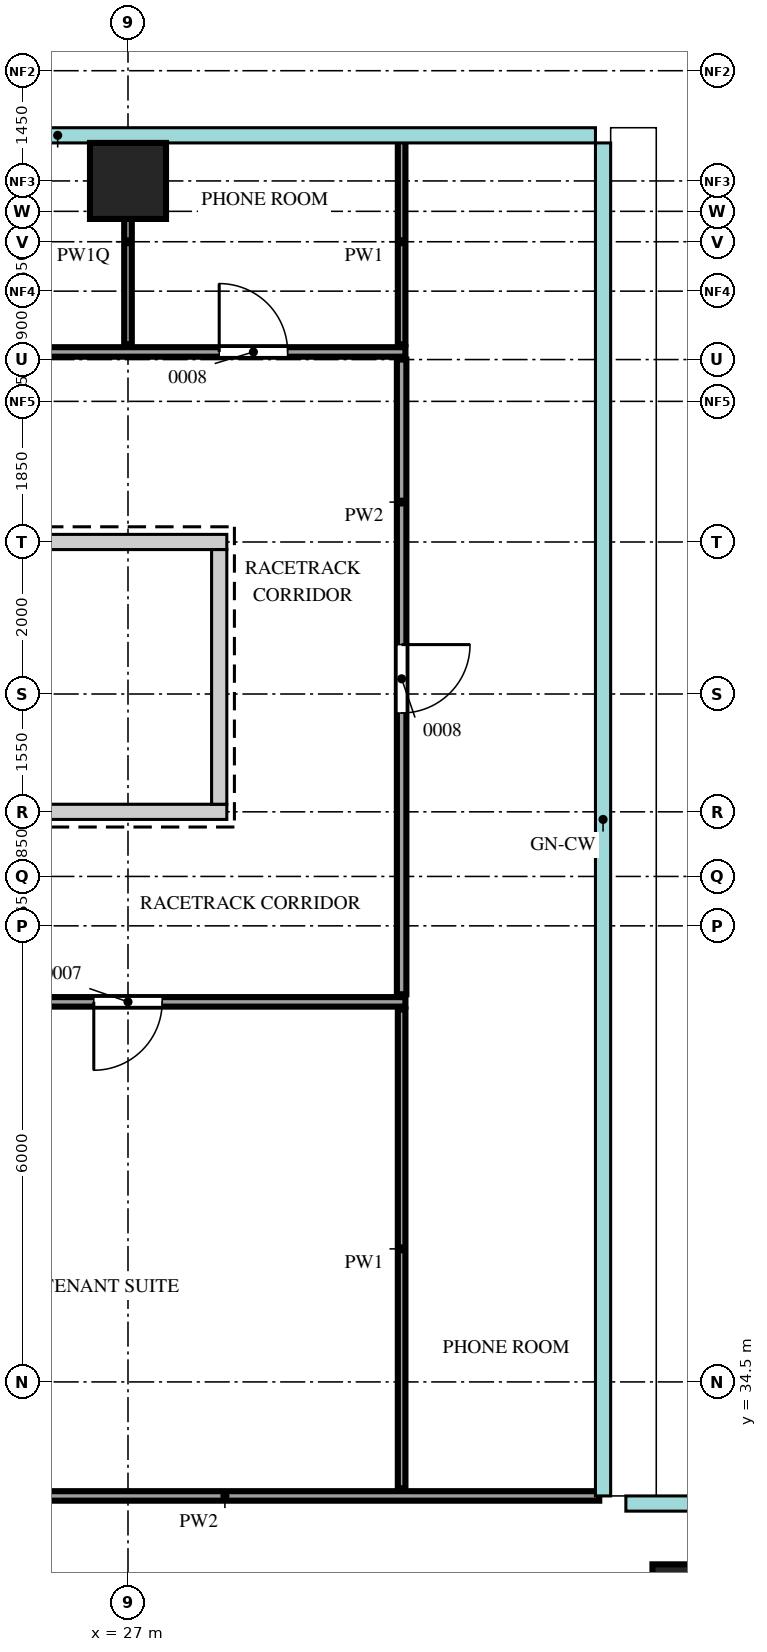
"""IFC4 building model, lengths in metres.
Left out: names, types, materials, properties, quantities, classifications, styles, units other than length and angle.
Written with IfcOpenShell. Run it as: python <this file> out.ifc"""

import sys

from ifc_helpers import new_model, si_unit, direction, frame, frame_2d, origin, origin_2d, place, context, subcontext, project, spatial, rectangle, extrude, source, transform, mapped, element, fill, save


model = new_model("IFC4")
c1 = context("Model", 3, precision=1e-05, world=origin(), true_north=direction((0.0, 1.0)))
c2 = subcontext(c1, "Body", "Model", "MODEL_VIEW")
j1 = project(units=[si_unit("LENGTHUNIT", "METRE"), si_unit("PLANEANGLEUNIT", "RADIAN")], contexts=[c1])
p1 = place(None, origin())
s1 = spatial("IfcSite", under=j1, at=p1, CompositionType="ELEMENT")
p2 = place(p1, origin())
s2 = spatial("IfcBuilding", under=s1, at=p2, CompositionType="ELEMENT")
p3 = place(p2, frame((0.0, 0.0, 180.7)))
s3 = spatial("IfcBuildingStorey", under=s2, at=p3, CompositionType="ELEMENT", Elevation=180.7)
m1 = source(origin(), c2, "Body", "SweptSolid", [
    extrude(rectangle(XDim=7.1, YDim=0.2, at=frame_2d((3.55, 0.0))), origin(), (0.0, 0.0, 1.0), 3.75),
])
p4 = place(p3, frame((21.2, 45.55, 0.0), z_axis=(0.0, 0.0, 1.0), x_axis=(1.0, 0.0, 0.0)))
e1 = element("IfcWall", 1, at=p4, inside=s3, PredefinedType="SHEAR", context=c2, shape_type="MappedRepresentation", body=[
    mapped(m1, transform((0.0, 0.0, 0.0))),
])
m2 = source(origin(), c2, "Body", "SweptSolid", [
    extrude(rectangle(XDim=1.2, YDim=2.1, at=frame_2d((0.6, 1.05))), frame((0.0, 0.11, 0.0), z_axis=(0.0, -1.0, 0.0), x_axis=(1.0, 0.0, 0.0)), (0.0, 0.0, 1.0), 0.22),
])
p5 = place(p4, frame((0.15, 0.0, 0.0)))
e2 = element("IfcOpeningElement", 2, at=p5, cuts=e1, PredefinedType="OPENING", context=c2, shape_type="MappedRepresentation", body=[
    mapped(m2, transform((0.0, 0.0, 0.0))),
])
p6 = place(p3, frame((21.2, 42.0, 0.0), z_axis=(0.0, 0.0, 1.0), x_axis=(1.0, 0.0, 0.0)))
e3 = element("IfcWall", 3, at=p6, inside=s3, PredefinedType="SHEAR", context=c2, shape_type="MappedRepresentation", body=[
    mapped(m1, transform((0.0, 0.0, 0.0))),
])
m3 = source(origin(), c2, "Body", "SweptSolid", [
    extrude(rectangle(XDim=3.35, YDim=0.2, at=frame_2d((1.675, 0.0))), origin(), (0.0, 0.0, 1.0), 3.75),
])
p7 = place(p3, frame((28.2, 42.1, 0.0), z_axis=(0.0, 0.0, 1.0), x_axis=(0.0, 1.0, 0.0)))
e4 = element("IfcWall", 4, at=p7, inside=s3, PredefinedType="SHEAR", context=c2, shape_type="MappedRepresentation", body=[
    mapped(m3, transform((0.0, 0.0, 0.0))),
])
m4 = source(origin(), c2, "Body", "SweptSolid", [
    extrude(rectangle(XDim=1.0, YDim=1.0, at=origin_2d()), origin(), (0.0, 0.0, 1.0), 3.75),
])
p8 = place(p3, frame((27.0, 50.3, 0.0), z_axis=(0.0, 0.0, 1.0), x_axis=(1.0, 0.0, 0.0)))
e5 = element("IfcColumn", 5, at=p8, inside=s3, PredefinedType="COLUMN", context=c2, shape_type="MappedRepresentation", body=[
    mapped(m4, transform((0.0, 0.0, 0.0))),
])
m5 = source(origin(), c2, "Body", "SweptSolid", [
    extrude(rectangle(XDim=1.2, YDim=1.2, at=origin_2d()), origin(), (0.0, 0.0, 1.0), 3.75),
])
p9 = place(p3, frame((34.5, 31.5, 0.0), z_axis=(0.0, 0.0, 1.0), x_axis=(1.0, 0.0, 0.0)))
e6 = element("IfcColumn", 6, at=p9, inside=s3, PredefinedType="COLUMN", context=c2, shape_type="MappedRepresentation", body=[
    mapped(m5, transform((0.0, 0.0, 0.0))),
])
m6 = source(origin(), c2, "Body", "SweptSolid", [
    extrude(rectangle(XDim=9.85, YDim=0.125, at=frame_2d((4.925, 0.0))), origin(), (0.0, 0.0, 1.0), 3.8),
])
p10 = place(p3, frame((23.35, 33.0, 0.0), z_axis=(0.0, 0.0, 1.0), x_axis=(1.0, 0.0, 0.0)))
e7 = element("IfcWall", 7, at=p10, inside=s3, PredefinedType="PARTITIONING", context=c2, shape_type="MappedRepresentation", body=[
    mapped(m6, transform((0.0, 0.0, 0.0))),
])
m7 = source(origin(), c2, "Body", "SweptSolid", [
    extrude(rectangle(XDim=6.3, YDim=0.1, at=frame_2d((3.15, 0.0))), origin(), (0.0, 0.0, 1.0), 3.8),
])
p11 = place(p3, frame((30.6, 33.1, 0.0), z_axis=(0.0, 0.0, 1.0), x_axis=(0.0, 1.0, 0.0)))
e8 = element("IfcWall", 8, at=p11, inside=s3, PredefinedType="PARTITIONING", context=c2, shape_type="MappedRepresentation", body=[
    mapped(m7, transform((0.0, 0.0, 0.0))),
])
m8 = source(origin(), c2, "Body", "SweptSolid", [
    extrude(rectangle(XDim=7.3, YDim=0.125, at=frame_2d((3.65, 0.0))), origin(), (0.0, 0.0, 1.0), 3.8),
])
p12 = place(p3, frame((23.35, 39.5, 0.0), z_axis=(0.0, 0.0, 1.0), x_axis=(1.0, 0.0, 0.0)))
e9 = element("IfcWall", 9, at=p12, inside=s3, PredefinedType="PARTITIONING", context=c2, shape_type="MappedRepresentation", body=[
    mapped(m8, transform((0.0, 0.0, 0.0))),
])
m9 = source(origin(), c2, "Body", "SweptSolid", [
    extrude(rectangle(XDim=0.9, YDim=2.1, at=frame_2d((0.45, 1.05))), frame((0.0, 0.073, 0.0), z_axis=(0.0, -1.0, 0.0), x_axis=(1.0, 0.0, 0.0)), (0.0, 0.0, 1.0), 0.145),
])
p13 = place(p12, frame((3.2, 0.0, 0.0)))
e10 = element("IfcOpeningElement", 10, at=p13, cuts=e9, PredefinedType="OPENING", context=c2, shape_type="MappedRepresentation", body=[
    mapped(m9, transform((0.0, 0.0, 0.0))),
])
m10 = source(origin(), c2, "Body", "SweptSolid", [
    extrude(rectangle(XDim=8.35, YDim=0.125, at=frame_2d((4.175, 0.0))), origin(), (0.0, 0.0, 1.0), 3.8),
])
p14 = place(p3, frame((30.6, 39.6, 0.0), z_axis=(0.0, 0.0, 1.0), x_axis=(0.0, 1.0, 0.0)))
e11 = element("IfcWall", 11, at=p14, inside=s3, PredefinedType="PARTITIONING", context=c2, shape_type="MappedRepresentation", body=[
    mapped(m10, transform((0.0, 0.0, 0.0))),
])
p15 = place(p14, frame((3.7, 0.0, 0.0)))
e12 = element("IfcOpeningElement", 12, at=p15, cuts=e11, PredefinedType="OPENING", context=c2, shape_type="MappedRepresentation", body=[
    mapped(m9, transform((0.0, 0.0, 0.0))),
])
m11 = source(origin(), c2, "Body", "SweptSolid", [
    extrude(rectangle(XDim=2.7, YDim=0.1, at=frame_2d((1.35, 0.0))), origin(), (0.0, 0.0, 1.0), 3.42),
])
p16 = place(p3, frame((27.0, 48.15, 0.0), z_axis=(0.0, 0.0, 1.0), x_axis=(0.0, 1.0, 0.0)))
e13 = element("IfcWall", 13, at=p16, inside=s3, PredefinedType="PARTITIONING", context=c2, shape_type="MappedRepresentation", body=[
    mapped(m11, transform((0.0, 0.0, 0.0))),
])
m12 = source(origin(), c2, "Body", "SweptSolid", [
    extrude(rectangle(XDim=2.7, YDim=0.1, at=frame_2d((1.35, 0.0))), origin(), (0.0, 0.0, 1.0), 3.8),
])
p17 = place(p3, frame((30.6, 48.15, 0.0), z_axis=(0.0, 0.0, 1.0), x_axis=(0.0, 1.0, 0.0)))
e14 = element("IfcWall", 14, at=p17, inside=s3, PredefinedType="PARTITIONING", context=c2, shape_type="MappedRepresentation", body=[
    mapped(m12, transform((0.0, 0.0, 0.0))),
])
m13 = source(origin(), c2, "Body", "SweptSolid", [
    extrude(rectangle(XDim=13.9, YDim=0.125, at=frame_2d((6.95, 0.0))), origin(), (0.0, 0.0, 1.0), 3.8),
])
p18 = place(p3, frame((16.75, 48.05, 0.0), z_axis=(0.0, 0.0, 1.0), x_axis=(1.0, 0.0, 0.0)))
e15 = element("IfcWall", 15, at=p18, inside=s3, PredefinedType="PARTITIONING", context=c2, shape_type="MappedRepresentation", body=[
    mapped(m13, transform((0.0, 0.0, 0.0))),
])
p19 = place(p18, frame((2.7, 0.0, 0.0)))
e16 = element("IfcOpeningElement", 16, at=p19, cuts=e15, PredefinedType="OPENING", context=c2, shape_type="MappedRepresentation", body=[
    mapped(m9, transform((0.0, 0.0, 0.0))),
])
p20 = place(p18, frame((11.45, 0.0, 0.0)))
e17 = element("IfcOpeningElement", 17, at=p20, cuts=e15, PredefinedType="OPENING", context=c2, shape_type="MappedRepresentation", body=[
    mapped(m9, transform((0.0, 0.0, 0.0))),
])
m14 = source(origin(), c2, "Body", "SweptSolid", [
    extrude(rectangle(XDim=0.9, YDim=2.1, at=frame_2d((0.45, 1.05))), frame((0.0, 0.025, 0.0), z_axis=(0.0, -1.0, 0.0), x_axis=(1.0, 0.0, 0.0)), (0.0, 0.0, 1.0), 0.05),
])
p21 = place(p13, origin())
e18 = element("IfcDoor", 18, at=p21, inside=s3, OperationType="SINGLE_SWING_LEFT", PredefinedType="DOOR", context=c2, shape_type="MappedRepresentation", body=[
    mapped(m14, transform((0.0, 0.0, 0.0))),
])
fill(e10, e18)
p22 = place(p15, origin())
e19 = element("IfcDoor", 19, at=p22, inside=s3, OperationType="SINGLE_SWING_RIGHT", PredefinedType="DOOR", context=c2, shape_type="MappedRepresentation", body=[
    mapped(m14, transform((0.0, 0.0, 0.0))),
])
fill(e12, e19)
p23 = place(p20, origin())
e20 = element("IfcDoor", 20, at=p23, inside=s3, OperationType="SINGLE_SWING_RIGHT", PredefinedType="DOOR", context=c2, shape_type="MappedRepresentation", body=[
    mapped(m14, transform((0.0, 0.0, 0.0))),
])
fill(e17, e20)
save(model, sys.argv[1])
